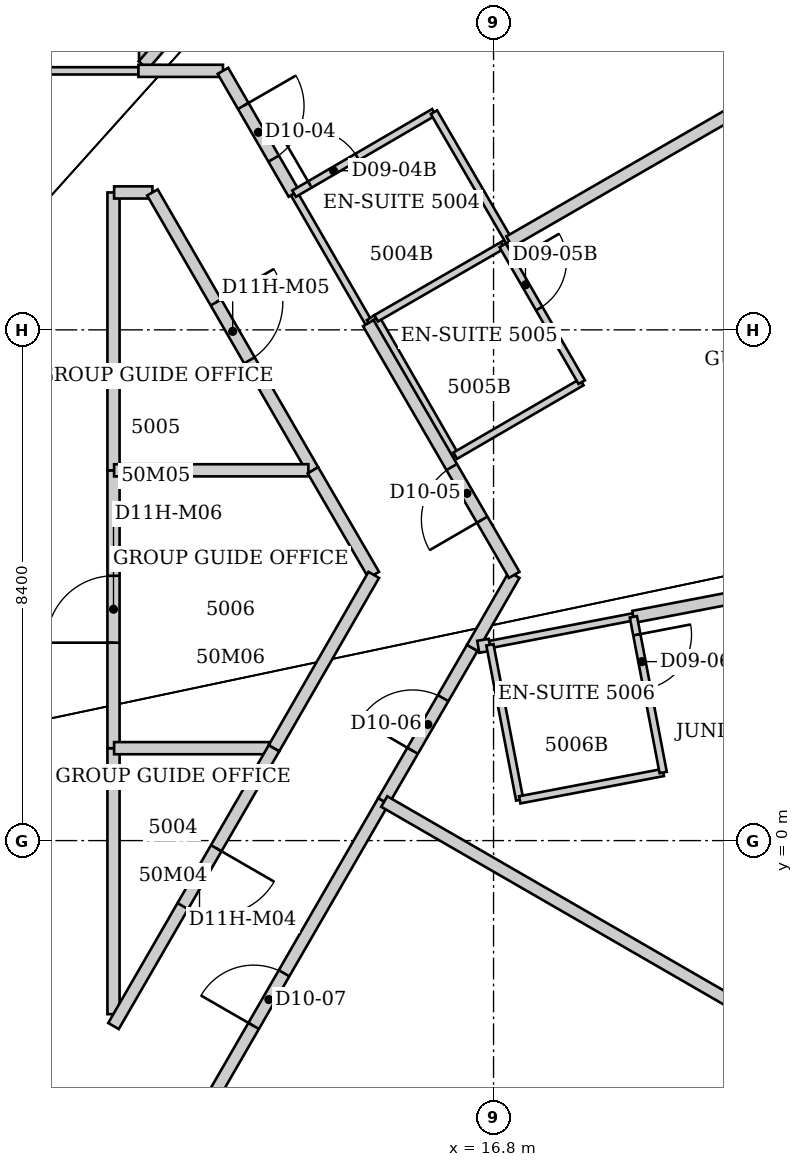
"""IFC4 building model, lengths in metres.
Left out: names, types, materials, properties, quantities, classifications, styles, units other than length and angle.
Written with IfcOpenShell. Run it as: python <this file> out.ifc"""

import sys

from ifc_helpers import new_model, si_unit, direction, frame, frame_2d, origin, place, context, subcontext, project, spatial, rectangle, extrude, element, fill, save


model = new_model("IFC4")
c1 = context("Model", 3, precision=1e-05, world=origin(), true_north=direction((0.0, 1.0)))
c2 = subcontext(c1, "Body", "Model", "MODEL_VIEW")
j1 = project(units=[si_unit("LENGTHUNIT", "METRE"), si_unit("PLANEANGLEUNIT", "RADIAN")], contexts=[c1])
p1 = place(None, origin())
s1 = spatial("IfcSite", under=j1, at=p1, CompositionType="ELEMENT")
p2 = place(p1, origin())
s2 = spatial("IfcBuilding", under=s1, at=p2, CompositionType="ELEMENT")
p3 = place(p2, frame((0.0, 0.0, 202.2)))
s3 = spatial("IfcBuildingStorey", under=s2, at=p3, CompositionType="ELEMENT", Elevation=202.2)
p4 = place(p3, frame((10.55, -2.855, 0.0), z_axis=(0.0, 0.0, 1.0), x_axis=(0.0, 1.0, 0.0)))
e1 = element("IfcWall", 1, at=p4, inside=s3, PredefinedType="PARTITIONING", context=c2, shape_type="SweptSolid", body=[
    extrude(rectangle(XDim=4.375, YDim=0.2, at=frame_2d((2.188, 0.0))), origin(), (0.0, 0.0, 1.0), 3.64),
])
p5 = place(p3, frame((10.55, 1.52, 0.0), z_axis=(0.0, 0.0, 1.0), x_axis=(0.0, 1.0, 0.0)))
e2 = element("IfcWall", 2, at=p5, inside=s3, PredefinedType="PARTITIONING", context=c2, shape_type="SweptSolid", body=[
    extrude(rectangle(XDim=4.57, YDim=0.2, at=frame_2d((2.285, 0.0))), origin(), (0.0, 0.0, 1.0), 3.64),
])
p6 = place(p5, frame((1.735, 0.0, 0.0)))
e3 = element("IfcOpeningElement", 3, at=p6, cuts=e2, PredefinedType="OPENING", context=c2, shape_type="SweptSolid", body=[
    extrude(rectangle(XDim=1.1, YDim=2.2, at=frame_2d((0.55, 1.1))), frame((0.0, 0.1, 0.0), z_axis=(0.0, -1.0, 0.0), x_axis=(1.0, 0.0, 0.0)), (0.0, 0.0, 1.0), 0.2),
])
p7 = place(p3, frame((10.55, 6.09, 0.0), z_axis=(0.0, 0.0, 1.0), x_axis=(0.0, 1.0, 0.0)))
e4 = element("IfcWall", 4, at=p7, inside=s3, PredefinedType="PARTITIONING", context=c2, shape_type="SweptSolid", body=[
    extrude(rectangle(XDim=4.57, YDim=0.2, at=frame_2d((2.285, 0.0))), origin(), (0.0, 0.0, 1.0), 3.64),
])
p8 = place(p3, frame((10.56, 1.52, 0.0), z_axis=(0.0, 0.0, 1.0), x_axis=(1.0, 0.0, 0.0)))
e5 = element("IfcWall", 5, at=p8, inside=s3, PredefinedType="PARTITIONING", context=c2, shape_type="SweptSolid", body=[
    extrude(rectangle(XDim=2.55, YDim=0.2, at=frame_2d((1.275, 0.0))), origin(), (0.0, 0.0, 1.0), 3.64),
])
p9 = place(p3, frame((10.56, 10.66, 0.0), z_axis=(0.0, 0.0, 1.0), x_axis=(1.0, 0.0, 0.0)))
e6 = element("IfcWall", 6, at=p9, inside=s3, PredefinedType="PARTITIONING", context=c2, shape_type="SweptSolid", body=[
    extrude(rectangle(XDim=0.63, YDim=0.2, at=frame_2d((0.315, 0.0))), origin(), (0.0, 0.0, 1.0), 3.64),
])
p10 = place(p3, frame((10.96, 12.66, 0.0), z_axis=(0.0, 0.0, 1.0), x_axis=(-1.0, 0.0, 0.0)))
e7 = element("IfcWall", 7, at=p10, inside=s3, PredefinedType="PARTITIONING", context=c2, shape_type="SweptSolid", body=[
    extrude(rectangle(XDim=2.43, YDim=0.12, at=frame_2d((1.215, 0.0))), origin(), (0.0, 0.0, 1.0), 3.64),
])
p11 = place(p3, frame((11.03, 12.83, 0.0), z_axis=(0.0, 0.0, 1.0), x_axis=(0.0, 1.0, 0.0)))
e8 = element("IfcWall", 8, at=p11, inside=s3, PredefinedType="PARTITIONING", context=c2, shape_type="SweptSolid", body=[
    extrude(rectangle(XDim=2.5, YDim=0.12, at=frame_2d((1.25, 0.0))), origin(), (0.0, 0.0, 1.0), 3.038),
])
p12 = place(p3, frame((11.04, 12.751, 0.0), z_axis=(0.0, 0.0, 1.0), x_axis=(0.654384042683, 0.756162366613, 0.0)))
e9 = element("IfcWall", 9, at=p12, inside=s3, PredefinedType="PARTITIONING", context=c2, shape_type="SweptSolid", body=[
    extrude(rectangle(XDim=10.667, YDim=0.2, at=frame_2d((5.333, 0.0))), origin(), (0.0, 0.0, 1.0), 3.64),
])
p13 = place(p3, frame((11.19, 10.66, 0.0), z_axis=(0.0, 0.0, 1.0), x_axis=(0.500248310865, -0.865881993967, 0.0)))
e10 = element("IfcWall", 10, at=p13, inside=s3, PredefinedType="PARTITIONING", context=c2, shape_type="SweptSolid", body=[
    extrude(rectangle(XDim=5.278, YDim=0.2, at=frame_2d((2.639, 0.0))), origin(), (0.0, 0.0, 1.0), 3.64),
])
p14 = place(p13, frame((2.089, 0.0, 0.0)))
e11 = element("IfcOpeningElement", 11, at=p14, cuts=e10, PredefinedType="OPENING", context=c2, shape_type="SweptSolid", body=[
    extrude(rectangle(XDim=1.1, YDim=2.2, at=frame_2d((0.55, 1.1))), frame((0.0, 0.1, 0.0), z_axis=(0.0, -1.0, 0.0), x_axis=(1.0, 0.0, 0.0)), (0.0, 0.0, 1.0), 0.2),
])
p15 = place(p3, frame((11.22, -5.88, 0.0), z_axis=(0.0, 0.0, 1.0), x_axis=(0.500004606796, 0.866022744033, 0.0)))
e12 = element("IfcWall", 12, at=p15, inside=s3, PredefinedType="PARTITIONING", context=c2, shape_type="SweptSolid", body=[
    extrude(rectangle(XDim=7.54, YDim=0.2, at=frame_2d((3.77, 0.0))), origin(), (0.0, 0.0, 1.0), 3.64),
])
p16 = place(p15, frame((3.27, 0.0, 0.0)))
e13 = element("IfcOpeningElement", 13, at=p16, cuts=e12, PredefinedType="OPENING", context=c2, shape_type="SweptSolid", body=[
    extrude(rectangle(XDim=1.0, YDim=2.13, at=frame_2d((0.5, 1.065))), frame((0.0, 0.1, 0.0), z_axis=(0.0, -1.0, 0.0), x_axis=(1.0, 0.0, 0.0)), (0.0, 0.0, 1.0), 0.2),
])
p17 = place(p3, frame((12.35, 12.66, 0.0), z_axis=(0.0, 0.0, 1.0), x_axis=(-1.0, 0.0, 0.0)))
e14 = element("IfcWall", 14, at=p17, inside=s3, PredefinedType="PARTITIONING", context=c2, shape_type="SweptSolid", body=[
    extrude(rectangle(XDim=1.39, YDim=0.2, at=frame_2d((0.695, 0.0))), origin(), (0.0, 0.0, 1.0), 3.64),
])
p18 = place(p3, frame((12.35, 12.66, 0.0), z_axis=(0.0, 0.0, 1.0), x_axis=(0.500120771724, -0.865955664968, 0.0)))
e15 = element("IfcWall", 15, at=p18, inside=s3, PredefinedType="PARTITIONING", context=c2, shape_type="SweptSolid", body=[
    extrude(rectangle(XDim=2.334, YDim=0.2, at=frame_2d((1.167, 0.0))), origin(), (0.0, 0.0, 1.0), 3.64),
])
p19 = place(p18, frame((0.667, 0.0, 0.0)))
e16 = element("IfcOpeningElement", 16, at=p19, cuts=e15, PredefinedType="OPENING", context=c2, shape_type="SweptSolid", body=[
    extrude(rectangle(XDim=1.0, YDim=2.13, at=frame_2d((0.5, 1.065))), frame((0.0, 0.1, 0.0), z_axis=(0.0, -1.0, 0.0), x_axis=(1.0, 0.0, 0.0)), (0.0, 0.0, 1.0), 0.2),
])
p20 = place(p3, frame((13.19, 1.52, 0.0), z_axis=(0.0, 0.0, 1.0), x_axis=(-0.500193590286, -0.865913605527, 0.0)))
e17 = element("IfcWall", 17, at=p20, inside=s3, PredefinedType="PARTITIONING", context=c2, shape_type="SweptSolid", body=[
    extrude(rectangle(XDim=5.278, YDim=0.2, at=frame_2d((2.639, 0.0))), origin(), (0.0, 0.0, 1.0), 3.64),
])
p21 = place(p20, frame((1.9, 0.0, 0.0)))
e18 = element("IfcOpeningElement", 18, at=p21, cuts=e17, PredefinedType="OPENING", context=c2, shape_type="SweptSolid", body=[
    extrude(rectangle(XDim=1.1, YDim=2.2, at=frame_2d((0.55, 1.1))), frame((0.0, 0.1, 0.0), z_axis=(0.0, -1.0, 0.0), x_axis=(1.0, 0.0, 0.0)), (0.0, 0.0, 1.0), 0.2),
])
p22 = place(p3, frame((13.52, 10.64, 0.0), z_axis=(0.0, 0.0, 1.0), x_axis=(0.500046071023, -0.865998803033, 0.0)))
e19 = element("IfcWall", 19, at=p22, inside=s3, PredefinedType="PARTITIONING", context=c2, shape_type="SweptSolid", body=[
    extrude(rectangle(XDim=2.46, YDim=0.12, at=frame_2d((1.23, 0.0))), origin(), (0.0, 0.0, 1.0), 3.64),
])
p23 = place(p3, frame((13.755, 6.09, 0.0), z_axis=(0.0, 0.0, 1.0), x_axis=(-1.0, 0.0, 0.0)))
e20 = element("IfcWall", 20, at=p23, inside=s3, PredefinedType="PARTITIONING", context=c2, shape_type="SweptSolid", body=[
    extrude(rectangle(XDim=3.195, YDim=0.2, at=frame_2d((1.597, 0.0))), origin(), (0.0, 0.0, 1.0), 3.64),
])
p24 = place(p3, frame((13.83, 6.09, 0.0), z_axis=(0.0, 0.0, 1.0), x_axis=(0.502573539539, -0.864534462792, 0.0)))
e21 = element("IfcWall", 21, at=p24, inside=s3, PredefinedType="PARTITIONING", context=c2, shape_type="SweptSolid", body=[
    extrude(rectangle(XDim=1.99, YDim=0.2, at=frame_2d((0.995, 0.0))), origin(), (0.0, 0.0, 1.0), 3.64),
])
p25 = place(p3, frame((14.75, 8.51, 0.0), z_axis=(0.0, 0.0, 1.0), x_axis=(0.831528837533, 0.555481585969, 0.0)))
e22 = element("IfcWall", 22, at=p25, inside=s3, PredefinedType="PARTITIONING", context=c2, shape_type="SweptSolid", body=[
    extrude(rectangle(XDim=0.144, YDim=0.12, at=frame_2d((0.072, 0.0))), origin(), (0.0, 0.0, 1.0), 3.64),
])
p26 = place(p3, frame((14.83, 4.37, 0.0), z_axis=(0.0, 0.0, 1.0), x_axis=(-0.498775186059, -0.866731396554, 0.0)))
e23 = element("IfcWall", 23, at=p26, inside=s3, PredefinedType="PARTITIONING", context=c2, shape_type="SweptSolid", body=[
    extrude(rectangle(XDim=3.288, YDim=0.2, at=frame_2d((1.644, 0.0))), origin(), (0.0, 0.0, 1.0), 3.64),
])
p27 = place(p3, frame((14.87, 8.59, 0.0), z_axis=(0.0, 0.0, 1.0), x_axis=(0.498557331759, -0.866856728041, 0.0)))
e24 = element("IfcWall", 24, at=p27, inside=s3, PredefinedType="PARTITIONING", context=c2, shape_type="SweptSolid", body=[
    extrude(rectangle(XDim=2.607, YDim=0.12, at=frame_2d((1.304, 0.0))), origin(), (0.0, 0.0, 1.0), 3.64),
])
p28 = place(p3, frame((14.87, 8.59, 0.0), z_axis=(0.0, 0.0, 1.0), x_axis=(0.866177122335, 0.499737123639, 0.0)))
e25 = element("IfcWall", 25, at=p28, inside=s3, PredefinedType="PARTITIONING", context=c2, shape_type="SweptSolid", body=[
    extrude(rectangle(XDim=2.401, YDim=0.12, at=frame_2d((1.201, 0.0))), origin(), (0.0, 0.0, 1.0), 2.878),
])
p29 = place(p3, frame((14.99, 0.65, 0.0), z_axis=(0.0, 0.0, 1.0), x_axis=(0.501330358107, 0.865255957529, 0.0)))
e26 = element("IfcWall", 26, at=p29, inside=s3, PredefinedType="PARTITIONING", context=c2, shape_type="SweptSolid", body=[
    extrude(rectangle(XDim=2.912, YDim=0.2, at=frame_2d((1.456, 0.0))), origin(), (0.0, 0.0, 1.0), 3.64),
])
p30 = place(p29, frame((0.956, 0.0, 0.0)))
e27 = element("IfcOpeningElement", 27, at=p30, cuts=e26, PredefinedType="OPENING", context=c2, shape_type="SweptSolid", body=[
    extrude(rectangle(XDim=1.0, YDim=2.13, at=frame_2d((0.5, 1.065))), frame((0.0, 0.1, 0.0), z_axis=(0.0, -1.0, 0.0), x_axis=(1.0, 0.0, 0.0)), (0.0, 0.0, 1.0), 0.2),
])
p31 = place(p3, frame((15.82, 11.98, 0.0), z_axis=(0.0, 0.0, 1.0), x_axis=(-0.864041571379, -0.503420463359, 0.0)))
e28 = element("IfcWall", 28, at=p31, inside=s3, PredefinedType="PARTITIONING", context=c2, shape_type="SweptSolid", body=[
    extrude(rectangle(XDim=2.662, YDim=0.12, at=frame_2d((1.331, 0.0))), origin(), (0.0, 0.0, 1.0), 3.64),
])
p32 = place(p31, frame((1.462, 0.0, 0.0)))
e29 = element("IfcOpeningElement", 29, at=p32, cuts=e28, PredefinedType="OPENING", context=c2, shape_type="SweptSolid", body=[
    extrude(rectangle(XDim=0.9, YDim=2.03, at=frame_2d((0.45, 1.015))), frame((0.0, 0.06, 0.0), z_axis=(0.0, -1.0, 0.0), x_axis=(1.0, 0.0, 0.0)), (0.0, 0.0, 1.0), 0.12),
])
p33 = place(p3, frame((16.17, 6.33, 0.0), z_axis=(0.0, 0.0, 1.0), x_axis=(0.864396442809, 0.502810888564, 0.0)))
e30 = element("IfcWall", 30, at=p33, inside=s3, PredefinedType="PARTITIONING", context=c2, shape_type="SweptSolid", body=[
    extrude(rectangle(XDim=2.406, YDim=0.12, at=frame_2d((1.203, 0.0))), origin(), (0.0, 0.0, 1.0), 3.64),
])
p34 = place(p3, frame((16.45, 3.17, 0.0), z_axis=(0.0, 0.0, 1.0), x_axis=(0.49845455473, 0.866915830325, 0.0)))
e31 = element("IfcWall", 31, at=p34, inside=s3, PredefinedType="PARTITIONING", context=c2, shape_type="SweptSolid", body=[
    extrude(rectangle(XDim=1.384, YDim=0.2, at=frame_2d((0.692, 0.0))), origin(), (0.0, 0.0, 1.0), 3.64),
])
p35 = place(p3, frame((16.549, 3.187, 0.0), z_axis=(0.0, 0.0, 1.0), x_axis=(0.985496381106, 0.169696443175, 0.0)))
e32 = element("IfcWall", 32, at=p35, inside=s3, PredefinedType="PARTITIONING", context=c2, shape_type="SweptSolid", body=[
    extrude(rectangle(XDim=0.194, YDim=0.2, at=frame_2d((0.097, 0.0))), origin(), (0.0, 0.0, 1.0), 3.64),
])
p36 = place(p3, frame((16.739, 3.225, 0.0), z_axis=(0.0, 0.0, 1.0), x_axis=(0.981946287277, 0.189159955868, 0.0)))
e33 = element("IfcWall", 33, at=p36, inside=s3, PredefinedType="PARTITIONING", context=c2, shape_type="SweptSolid", body=[
    extrude(rectangle(XDim=2.405, YDim=0.12, at=frame_2d((1.202, 0.0))), origin(), (0.0, 0.0, 1.0), 3.64),
])
p37 = place(p3, frame((16.74, 3.22, 0.0), z_axis=(0.0, 0.0, 1.0), x_axis=(0.188697442844, -0.982035271802, 0.0)))
e34 = element("IfcWall", 34, at=p37, inside=s3, PredefinedType="PARTITIONING", context=c2, shape_type="SweptSolid", body=[
    extrude(rectangle(XDim=2.597, YDim=0.12, at=frame_2d((1.298, 0.0))), origin(), (0.0, 0.0, 1.0), 3.64),
])
p38 = place(p3, frame((16.95, 9.79, 0.0), z_axis=(0.0, 0.0, 1.0), x_axis=(0.877895572914, 0.478852130681, 0.0)))
e35 = element("IfcWall", 35, at=p38, inside=s3, PredefinedType="PARTITIONING", context=c2, shape_type="SweptSolid", body=[
    extrude(rectangle(XDim=0.125, YDim=0.12, at=frame_2d((0.063, 0.0))), origin(), (0.0, 0.0, 1.0), 3.64),
])
p39 = place(p3, frame((17.06, 9.85, 0.0), z_axis=(0.0, 0.0, 1.0), x_axis=(-0.503131731744, 0.864209731785, 0.0)))
e36 = element("IfcWall", 36, at=p39, inside=s3, PredefinedType="PARTITIONING", context=c2, shape_type="SweptSolid", body=[
    extrude(rectangle(XDim=2.465, YDim=0.12, at=frame_2d((1.232, 0.0))), origin(), (0.0, 0.0, 1.0), 3.64),
])
p40 = place(p3, frame((17.06, 9.85, 0.0), z_axis=(0.0, 0.0, 1.0), x_axis=(0.866166787958, 0.499755035431, 0.0)))
e37 = element("IfcWall", 37, at=p40, inside=s3, PredefinedType="PARTITIONING", context=c2, shape_type="SweptSolid", body=[
    extrude(rectangle(XDim=6.703, YDim=0.2, at=frame_2d((3.352, 0.0))), origin(), (0.0, 0.0, 1.0), 2.878),
])
p41 = place(p3, frame((17.14, 4.37, 0.0), z_axis=(0.0, 0.0, 1.0), x_axis=(-0.501524901322, 0.865143209737, 0.0)))
e38 = element("IfcWall", 38, at=p41, inside=s3, PredefinedType="PARTITIONING", context=c2, shape_type="SweptSolid", body=[
    extrude(rectangle(XDim=4.785, YDim=0.2, at=frame_2d((2.393, 0.0))), origin(), (0.0, 0.0, 1.0), 3.64),
])
p42 = place(p41, frame((1.05, 0.0, 0.0)))
e39 = element("IfcOpeningElement", 39, at=p42, cuts=e38, PredefinedType="OPENING", context=c2, shape_type="SweptSolid", body=[
    extrude(rectangle(XDim=1.0, YDim=2.13, at=frame_2d((0.5, 1.065))), frame((0.0, 0.1, 0.0), z_axis=(0.0, -1.0, 0.0), x_axis=(1.0, 0.0, 0.0)), (0.0, 0.0, 1.0), 0.2),
])
p43 = place(p3, frame((17.23, 0.67, 0.0), z_axis=(0.0, 0.0, 1.0), x_axis=(0.982288725898, 0.187373581313, 0.0)))
e40 = element("IfcWall", 40, at=p43, inside=s3, PredefinedType="PARTITIONING", context=c2, shape_type="SweptSolid", body=[
    extrude(rectangle(XDim=2.403, YDim=0.12, at=frame_2d((1.201, 0.0))), origin(), (0.0, 0.0, 1.0), 3.64),
])
p44 = place(p3, frame((18.25, 7.54, 0.0), z_axis=(0.0, 0.0, 1.0), x_axis=(-0.500291685314, 0.865856933682, 0.0)))
e41 = element("IfcWall", 41, at=p44, inside=s3, PredefinedType="PARTITIONING", context=c2, shape_type="SweptSolid", body=[
    extrude(rectangle(XDim=2.599, YDim=0.12, at=frame_2d((1.299, 0.0))), origin(), (0.0, 0.0, 1.0), 3.64),
])
p45 = place(p44, frame((1.399, 0.0, 0.0)))
e42 = element("IfcOpeningElement", 42, at=p45, cuts=e41, PredefinedType="OPENING", context=c2, shape_type="SweptSolid", body=[
    extrude(rectangle(XDim=0.9, YDim=2.03, at=frame_2d((0.45, 1.015))), frame((0.0, 0.06, 0.0), z_axis=(0.0, -1.0, 0.0), x_axis=(1.0, 0.0, 0.0)), (0.0, 0.0, 1.0), 0.12),
])
p46 = place(p3, frame((19.1, 3.68, 0.0), z_axis=(0.0, 0.0, 1.0), x_axis=(0.982065840923, 0.188538282829, 0.0)))
e43 = element("IfcWall", 43, at=p46, inside=s3, PredefinedType="PARTITIONING", context=c2, shape_type="SweptSolid", body=[
    extrude(rectangle(XDim=8.085, YDim=0.2, at=frame_2d((4.043, 0.0))), origin(), (0.0, 0.0, 1.0), 3.64),
])
p47 = place(p3, frame((19.59, 1.12, 0.0), z_axis=(0.0, 0.0, 1.0), x_axis=(-0.188003058159, 0.982168442846, 0.0)))
e44 = element("IfcWall", 44, at=p47, inside=s3, PredefinedType="PARTITIONING", context=c2, shape_type="SweptSolid", body=[
    extrude(rectangle(XDim=2.606, YDim=0.12, at=frame_2d((1.303, 0.0))), origin(), (0.0, 0.0, 1.0), 3.64),
])
p48 = place(p47, frame((1.406, 0.0, 0.0)))
e45 = element("IfcOpeningElement", 45, at=p48, cuts=e44, PredefinedType="OPENING", context=c2, shape_type="SweptSolid", body=[
    extrude(rectangle(XDim=0.9, YDim=2.03, at=frame_2d((0.45, 1.015))), frame((0.0, 0.06, 0.0), z_axis=(0.0, -1.0, 0.0), x_axis=(1.0, 0.0, 0.0)), (0.0, 0.0, 1.0), 0.12),
])
p49 = place(p3, frame((22.324, -3.585, 0.0), z_axis=(0.0, 0.0, 1.0), x_axis=(-0.865987918257, 0.500064921217, 0.0)))
e46 = element("IfcWall", 46, at=p49, inside=s3, PredefinedType="PARTITIONING", context=c2, shape_type="SweptSolid", body=[
    extrude(rectangle(XDim=8.454, YDim=0.2, at=frame_2d((4.227, 0.0))), origin(), (0.0, 0.0, 1.0), 3.64),
])
p50 = place(p19, origin())
e47 = element("IfcDoor", 47, at=p50, inside=s3, OperationType="SINGLE_SWING_LEFT", PredefinedType="DOOR", context=c2, shape_type="SweptSolid", body=[
    extrude(rectangle(XDim=1.0, YDim=2.13, at=frame_2d((0.5, 1.065))), frame((0.0, 0.025, 0.0), z_axis=(0.0, -1.0, 0.0), x_axis=(1.0, 0.0, 0.0)), (0.0, 0.0, 1.0), 0.05),
])
fill(e16, e47)
p51 = place(p32, origin())
e48 = element("IfcDoor", 48, at=p51, inside=s3, OperationType="SINGLE_SWING_RIGHT", PredefinedType="DOOR", context=c2, shape_type="SweptSolid", body=[
    extrude(rectangle(XDim=0.9, YDim=2.03, at=frame_2d((0.45, 1.015))), frame((0.0, 0.025, 0.0), z_axis=(0.0, -1.0, 0.0), x_axis=(1.0, 0.0, 0.0)), (0.0, 0.0, 1.0), 0.05),
])
fill(e29, e48)
p52 = place(p42, origin())
e49 = element("IfcDoor", 49, at=p52, inside=s3, OperationType="SINGLE_SWING_LEFT", PredefinedType="DOOR", context=c2, shape_type="SweptSolid", body=[
    extrude(rectangle(XDim=1.0, YDim=2.13, at=frame_2d((0.5, 1.065))), frame((0.0, 0.025, 0.0), z_axis=(0.0, -1.0, 0.0), x_axis=(1.0, 0.0, 0.0)), (0.0, 0.0, 1.0), 0.05),
])
fill(e39, e49)
p53 = place(p45, origin())
e50 = element("IfcDoor", 50, at=p53, inside=s3, OperationType="SINGLE_SWING_RIGHT", PredefinedType="DOOR", context=c2, shape_type="SweptSolid", body=[
    extrude(rectangle(XDim=0.9, YDim=2.03, at=frame_2d((0.45, 1.015))), frame((0.0, 0.025, 0.0), z_axis=(0.0, -1.0, 0.0), x_axis=(1.0, 0.0, 0.0)), (0.0, 0.0, 1.0), 0.05),
])
fill(e42, e50)
p54 = place(p30, origin())
e51 = element("IfcDoor", 51, at=p54, inside=s3, OperationType="SINGLE_SWING_LEFT", PredefinedType="DOOR", context=c2, shape_type="SweptSolid", body=[
    extrude(rectangle(XDim=1.0, YDim=2.13, at=frame_2d((0.5, 1.065))), frame((0.0, 0.025, 0.0), z_axis=(0.0, -1.0, 0.0), x_axis=(1.0, 0.0, 0.0)), (0.0, 0.0, 1.0), 0.05),
])
fill(e27, e51)
p55 = place(p48, origin())
e52 = element("IfcDoor", 52, at=p55, inside=s3, OperationType="SINGLE_SWING_RIGHT", PredefinedType="DOOR", context=c2, shape_type="SweptSolid", body=[
    extrude(rectangle(XDim=0.9, YDim=2.03, at=frame_2d((0.45, 1.015))), frame((0.0, 0.025, 0.0), z_axis=(0.0, -1.0, 0.0), x_axis=(1.0, 0.0, 0.0)), (0.0, 0.0, 1.0), 0.05),
])
fill(e45, e52)
p56 = place(p16, origin())
e53 = element("IfcDoor", 53, at=p56, inside=s3, OperationType="SINGLE_SWING_LEFT", PredefinedType="DOOR", context=c2, shape_type="SweptSolid", body=[
    extrude(rectangle(XDim=1.0, YDim=2.13, at=frame_2d((0.5, 1.065))), frame((0.0, 0.025, 0.0), z_axis=(0.0, -1.0, 0.0), x_axis=(1.0, 0.0, 0.0)), (0.0, 0.0, 1.0), 0.05),
])
fill(e13, e53)
p57 = place(p21, origin())
e54 = element("IfcDoor", 54, at=p57, inside=s3, OperationType="SINGLE_SWING_LEFT", PredefinedType="DOOR", context=c2, shape_type="SweptSolid", body=[
    extrude(rectangle(XDim=1.1, YDim=2.2, at=frame_2d((0.55, 1.1))), frame((0.0, 0.025, 0.0), z_axis=(0.0, -1.0, 0.0), x_axis=(1.0, 0.0, 0.0)), (0.0, 0.0, 1.0), 0.05),
])
fill(e18, e54)
p58 = place(p14, origin())
e55 = element("IfcDoor", 55, at=p58, inside=s3, OperationType="SINGLE_SWING_LEFT", PredefinedType="DOOR", context=c2, shape_type="SweptSolid", body=[
    extrude(rectangle(XDim=1.1, YDim=2.2, at=frame_2d((0.55, 1.1))), frame((0.0, 0.025, 0.0), z_axis=(0.0, -1.0, 0.0), x_axis=(1.0, 0.0, 0.0)), (0.0, 0.0, 1.0), 0.05),
])
fill(e11, e55)
p59 = place(p6, origin())
e56 = element("IfcDoor", 56, at=p59, inside=s3, OperationType="SINGLE_SWING_LEFT", PredefinedType="DOOR", context=c2, shape_type="SweptSolid", body=[
    extrude(rectangle(XDim=1.1, YDim=2.2, at=frame_2d((0.55, 1.1))), frame((0.0, 0.025, 0.0), z_axis=(0.0, -1.0, 0.0), x_axis=(1.0, 0.0, 0.0)), (0.0, 0.0, 1.0), 0.05),
])
fill(e3, e56)
save(model, sys.argv[1])
